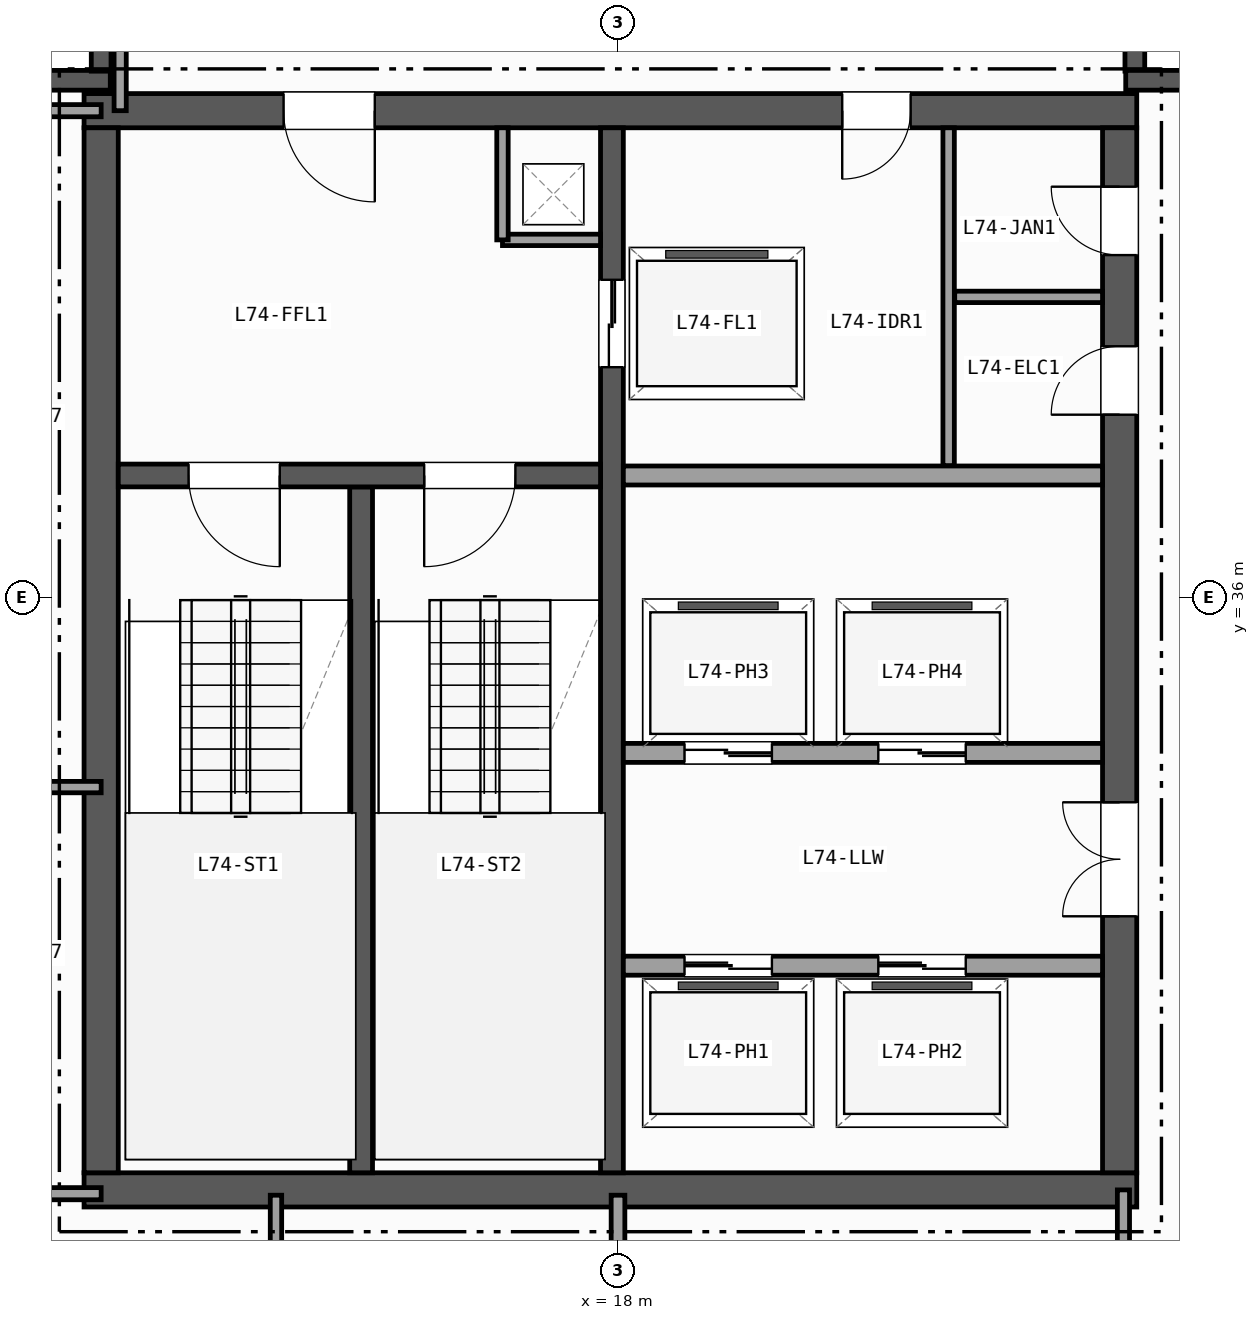
"""IFC4 building model, lengths in metres.
Left out: names, types, materials, properties, quantities, classifications, styles, units other than length and angle.
Written with IfcOpenShell. Run it as: python <this file> out.ifc"""

import sys

from ifc_helpers import new_model, si_unit, direction, frame, frame_2d, origin, place, context, subcontext, project, spatial, rectangle, extrude, element, fill, save


model = new_model("IFC4")
c1 = context("Model", 3, precision=1e-05, world=origin(), true_north=direction((0.0, 1.0)))
c2 = subcontext(c1, "Body", "Model", "MODEL_VIEW")
j1 = project(units=[si_unit("LENGTHUNIT", "METRE"), si_unit("PLANEANGLEUNIT", "RADIAN")], contexts=[c1])
p1 = place(None, origin())
s1 = spatial("IfcSite", under=j1, at=p1, CompositionType="ELEMENT")
p2 = place(p1, origin())
s2 = spatial("IfcBuilding", under=s1, at=p2, CompositionType="ELEMENT")
p3 = place(p2, frame((0.0, 0.0, 293.7)))
s3 = spatial("IfcBuildingStorey", under=s2, at=p3, CompositionType="ELEMENT", Elevation=293.7)
p4 = place(p3, frame((9.0, 42.8, 0.0), z_axis=(0.0, 0.0, 1.0), x_axis=(1.0, 0.0, 0.0)))
e1 = element("IfcWall", 1, at=p4, inside=s3, PredefinedType="SOLIDWALL", context=c2, shape_type="SweptSolid", body=[
    extrude(rectangle(XDim=2.32, YDim=0.26, at=frame_2d((1.16, 0.0))), origin(), (0.0, 0.0, 1.0), 3.37),
])
for number, where, z_axis, x_axis in (
    (2, (11.2, 42.92, 0.0), (0.0, 0.0, 1.0), (0.0, 1.0, 0.0)),
    (3, (24.8, 45.0, 0.0), (0.0, 0.0, 1.0), (0.0, -1.0, 0.0)),
):
    element("IfcWall", number, at=place(p3, frame(where, z_axis=z_axis, x_axis=x_axis)), inside=s3, PredefinedType="SOLIDWALL", context=c2, shape_type="SweptSolid", body=[
        extrude(rectangle(XDim=2.08, YDim=0.26, at=frame_2d((1.04, 0.0))), origin(), (0.0, 0.0, 1.0), 3.37),
    ])
p5 = place(p3, frame((24.68, 42.8, 0.0), z_axis=(0.0, 0.0, 1.0), x_axis=(1.0, 0.0, 0.0)))
e4 = element("IfcWall", 4, at=p5, inside=s3, PredefinedType="SOLIDWALL", context=c2, shape_type="SweptSolid", body=[
    extrude(rectangle(XDim=2.32, YDim=0.26, at=frame_2d((1.16, 0.0))), origin(), (0.0, 0.0, 1.0), 3.37),
])
p6 = place(p3, frame((10.975, 28.2, 0.0), z_axis=(0.0, 0.0, 1.0), x_axis=(1.0, 0.0, 0.0)))
e5 = element("IfcWall", 5, at=p6, inside=s3, PredefinedType="SHEAR", context=c2, shape_type="SweptSolid", body=[
    extrude(rectangle(XDim=13.85, YDim=0.45, at=frame_2d((6.925, 0.0))), origin(), (0.0, 0.0, 1.0), 3.37),
])
p7 = place(p3, frame((24.825, 42.4, 0.0), z_axis=(0.0, 0.0, 1.0), x_axis=(-1.0, 0.0, 0.0)))
e6 = element("IfcWall", 6, at=p7, inside=s3, PredefinedType="SHEAR", context=c2, shape_type="SweptSolid", body=[
    extrude(rectangle(XDim=13.85, YDim=0.45, at=frame_2d((6.925, 0.0))), origin(), (0.0, 0.0, 1.0), 3.37),
])
p8 = place(p7, frame((10.025, 0.0, 0.0)))
e7 = element("IfcOpeningElement", 7, at=p8, cuts=e6, PredefinedType="OPENING", context=c2, shape_type="SweptSolid", body=[
    extrude(rectangle(XDim=1.2, YDim=2.15, at=frame_2d((0.6, 1.075))), frame((0.0, 0.235, 0.0), z_axis=(0.0, -1.0, 0.0), x_axis=(1.0, 0.0, 0.0)), (0.0, 0.0, 1.0), 0.47),
])
p9 = place(p7, frame((2.975, 0.0, 0.0)))
e8 = element("IfcOpeningElement", 8, at=p9, cuts=e6, PredefinedType="OPENING", context=c2, shape_type="SweptSolid", body=[
    extrude(rectangle(XDim=0.9, YDim=2.1, at=frame_2d((0.45, 1.05))), frame((0.0, 0.235, 0.0), z_axis=(0.0, -1.0, 0.0), x_axis=(1.0, 0.0, 0.0)), (0.0, 0.0, 1.0), 0.47),
])
p10 = place(p3, frame((11.2, 42.175, 0.0), z_axis=(0.0, 0.0, 1.0), x_axis=(0.0, -1.0, 0.0)))
e9 = element("IfcWall", 9, at=p10, inside=s3, PredefinedType="SHEAR", context=c2, shape_type="SweptSolid", body=[
    extrude(rectangle(XDim=13.75, YDim=0.45, at=frame_2d((6.875, 0.0))), origin(), (0.0, 0.0, 1.0), 3.37),
])
p11 = place(p3, frame((24.6, 28.425, 0.0), z_axis=(0.0, 0.0, 1.0), x_axis=(0.0, 1.0, 0.0)))
e10 = element("IfcWall", 10, at=p11, inside=s3, PredefinedType="SHEAR", context=c2, shape_type="SweptSolid", body=[
    extrude(rectangle(XDim=13.75, YDim=0.45, at=frame_2d((6.875, 0.0))), origin(), (0.0, 0.0, 1.0), 3.37),
])
p12 = place(p11, frame((3.375, 0.0, 0.0)))
e11 = element("IfcOpeningElement", 11, at=p12, cuts=e10, PredefinedType="OPENING", context=c2, shape_type="SweptSolid", body=[
    extrude(rectangle(XDim=1.5, YDim=2.2, at=frame_2d((0.75, 1.1))), frame((0.0, 0.235, 0.0), z_axis=(0.0, -1.0, 0.0), x_axis=(1.0, 0.0, 0.0)), (0.0, 0.0, 1.0), 0.47),
])
p13 = place(p11, frame((9.975, 0.0, 0.0)))
e12 = element("IfcOpeningElement", 12, at=p13, cuts=e10, PredefinedType="OPENING", context=c2, shape_type="SweptSolid", body=[
    extrude(rectangle(XDim=0.9, YDim=2.1, at=frame_2d((0.45, 1.05))), frame((0.0, 0.235, 0.0), z_axis=(0.0, -1.0, 0.0), x_axis=(1.0, 0.0, 0.0)), (0.0, 0.0, 1.0), 0.47),
])
p14 = place(p11, frame((12.075, 0.0, 0.0)))
e13 = element("IfcOpeningElement", 13, at=p14, cuts=e10, PredefinedType="OPENING", context=c2, shape_type="SweptSolid", body=[
    extrude(rectangle(XDim=0.9, YDim=2.1, at=frame_2d((0.45, 1.05))), frame((0.0, 0.235, 0.0), z_axis=(0.0, -1.0, 0.0), x_axis=(1.0, 0.0, 0.0)), (0.0, 0.0, 1.0), 0.47),
])
p15 = place(p3, frame((14.62, 28.425, 0.0), z_axis=(0.0, 0.0, 1.0), x_axis=(0.0, 1.0, 0.0)))
e14 = element("IfcWall", 14, at=p15, inside=s3, PredefinedType="SHEAR", context=c2, shape_type="SweptSolid", body=[
    extrude(rectangle(XDim=9.025, YDim=0.3, at=frame_2d((4.512, 0.0))), origin(), (0.0, 0.0, 1.0), 3.37),
])
p16 = place(p3, frame((17.92, 42.175, 0.0), z_axis=(0.0, 0.0, 1.0), x_axis=(0.0, -1.0, 0.0)))
e15 = element("IfcWall", 15, at=p16, inside=s3, PredefinedType="SHEAR", context=c2, shape_type="SweptSolid", body=[
    extrude(rectangle(XDim=13.75, YDim=0.3, at=frame_2d((6.875, 0.0))), origin(), (0.0, 0.0, 1.0), 3.37),
])
p17 = place(p16, frame((2.0, 0.0, 0.0)))
e16 = element("IfcOpeningElement", 16, at=p17, cuts=e15, PredefinedType="OPENING", context=c2, shape_type="SweptSolid", body=[
    extrude(rectangle(XDim=1.15, YDim=2.15, at=frame_2d((0.575, 1.075))), frame((0.0, 0.16, 0.0), z_axis=(0.0, -1.0, 0.0), x_axis=(1.0, 0.0, 0.0)), (0.0, 0.0, 1.0), 0.32),
])
p18 = place(p3, frame((17.77, 37.6, 0.0), z_axis=(0.0, 0.0, 1.0), x_axis=(-1.0, 0.0, 0.0)))
e17 = element("IfcWall", 17, at=p18, inside=s3, PredefinedType="SHEAR", context=c2, shape_type="SweptSolid", body=[
    extrude(rectangle(XDim=6.345, YDim=0.3, at=frame_2d((3.172, 0.0))), origin(), (0.0, 0.0, 1.0), 3.37),
])
p19 = place(p18, frame((4.22, 0.0, 0.0)))
e18 = element("IfcOpeningElement", 18, at=p19, cuts=e17, PredefinedType="OPENING", context=c2, shape_type="SweptSolid", body=[
    extrude(rectangle(XDim=1.2, YDim=2.15, at=frame_2d((0.6, 1.075))), frame((0.0, 0.16, 0.0), z_axis=(0.0, -1.0, 0.0), x_axis=(1.0, 0.0, 0.0)), (0.0, 0.0, 1.0), 0.32),
])
p20 = place(p18, frame((1.12, 0.0, 0.0)))
e19 = element("IfcOpeningElement", 19, at=p20, cuts=e17, PredefinedType="OPENING", context=c2, shape_type="SweptSolid", body=[
    extrude(rectangle(XDim=1.2, YDim=2.15, at=frame_2d((0.6, 1.075))), frame((0.0, 0.16, 0.0), z_axis=(0.0, -1.0, 0.0), x_axis=(1.0, 0.0, 0.0)), (0.0, 0.0, 1.0), 0.32),
])
p21 = place(p3, frame((16.48, 40.7, 0.0), z_axis=(0.0, 0.0, 1.0), x_axis=(1.0, 0.0, 0.0)))
e20 = element("IfcWall", 20, at=p21, inside=s3, PredefinedType="PARTITIONING", context=c2, shape_type="SweptSolid", body=[
    extrude(rectangle(XDim=1.29, YDim=0.15, at=frame_2d((0.645, 0.0))), origin(), (0.0, 0.0, 1.0), 3.37),
])
p22 = place(p3, frame((16.48, 40.7, 0.0), z_axis=(0.0, 0.0, 1.0), x_axis=(0.0, 1.0, 0.0)))
e21 = element("IfcWall", 21, at=p22, inside=s3, PredefinedType="PARTITIONING", context=c2, shape_type="SweptSolid", body=[
    extrude(rectangle(XDim=1.475, YDim=0.15, at=frame_2d((0.738, 0.0))), origin(), (0.0, 0.0, 1.0), 3.37),
])
p23 = place(p3, frame((18.07, 37.6, 0.0), z_axis=(0.0, 0.0, 1.0), x_axis=(1.0, 0.0, 0.0)))
e22 = element("IfcWall", 22, at=p23, inside=s3, PredefinedType="PARTITIONING", context=c2, shape_type="SweptSolid", body=[
    extrude(rectangle(XDim=6.305, YDim=0.25, at=frame_2d((3.152, 0.0))), origin(), (0.0, 0.0, 1.0), 3.37),
])
p24 = place(p3, frame((18.07, 31.15, 0.0), z_axis=(0.0, 0.0, 1.0), x_axis=(1.0, 0.0, 0.0)))
e23 = element("IfcWall", 23, at=p24, inside=s3, PredefinedType="PARTITIONING", context=c2, shape_type="SweptSolid", body=[
    extrude(rectangle(XDim=6.305, YDim=0.25, at=frame_2d((3.152, 0.0))), origin(), (0.0, 0.0, 1.0), 3.37),
])
p25 = place(p24, frame((0.805, 0.0, 0.0)))
e24 = element("IfcOpeningElement", 24, at=p25, cuts=e23, PredefinedType="OPENING", context=c2, shape_type="SweptSolid", body=[
    extrude(rectangle(XDim=1.15, YDim=2.15, at=frame_2d((0.575, 1.075))), frame((0.0, 0.135, 0.0), z_axis=(0.0, -1.0, 0.0), x_axis=(1.0, 0.0, 0.0)), (0.0, 0.0, 1.0), 0.27),
])
p26 = place(p24, frame((3.355, 0.0, 0.0)))
e25 = element("IfcOpeningElement", 25, at=p26, cuts=e23, PredefinedType="OPENING", context=c2, shape_type="SweptSolid", body=[
    extrude(rectangle(XDim=1.15, YDim=2.15, at=frame_2d((0.575, 1.075))), frame((0.0, 0.135, 0.0), z_axis=(0.0, -1.0, 0.0), x_axis=(1.0, 0.0, 0.0)), (0.0, 0.0, 1.0), 0.27),
])
p27 = place(p3, frame((24.375, 33.95, 0.0), z_axis=(0.0, 0.0, 1.0), x_axis=(-1.0, 0.0, 0.0)))
e26 = element("IfcWall", 26, at=p27, inside=s3, PredefinedType="PARTITIONING", context=c2, shape_type="SweptSolid", body=[
    extrude(rectangle(XDim=6.305, YDim=0.25, at=frame_2d((3.152, 0.0))), origin(), (0.0, 0.0, 1.0), 3.37),
])
p28 = place(p27, frame((4.35, 0.0, 0.0)))
e27 = element("IfcOpeningElement", 27, at=p28, cuts=e26, PredefinedType="OPENING", context=c2, shape_type="SweptSolid", body=[
    extrude(rectangle(XDim=1.15, YDim=2.15, at=frame_2d((0.575, 1.075))), frame((0.0, 0.135, 0.0), z_axis=(0.0, -1.0, 0.0), x_axis=(1.0, 0.0, 0.0)), (0.0, 0.0, 1.0), 0.27),
])
p29 = place(p27, frame((1.8, 0.0, 0.0)))
e28 = element("IfcOpeningElement", 28, at=p29, cuts=e26, PredefinedType="OPENING", context=c2, shape_type="SweptSolid", body=[
    extrude(rectangle(XDim=1.15, YDim=2.15, at=frame_2d((0.575, 1.075))), frame((0.0, 0.135, 0.0), z_axis=(0.0, -1.0, 0.0), x_axis=(1.0, 0.0, 0.0)), (0.0, 0.0, 1.0), 0.27),
])
p30 = place(p3, frame((22.35, 37.73, 0.0), z_axis=(0.0, 0.0, 1.0), x_axis=(0.0, 1.0, 0.0)))
e29 = element("IfcWall", 29, at=p30, inside=s3, PredefinedType="PARTITIONING", context=c2, shape_type="SweptSolid", body=[
    extrude(rectangle(XDim=4.445, YDim=0.15, at=frame_2d((2.223, 0.0))), origin(), (0.0, 0.0, 1.0), 3.37),
])
p31 = place(p3, frame((22.43, 39.95, 0.0), z_axis=(0.0, 0.0, 1.0), x_axis=(1.0, 0.0, 0.0)))
e30 = element("IfcWall", 30, at=p31, inside=s3, PredefinedType="PARTITIONING", context=c2, shape_type="SweptSolid", body=[
    extrude(rectangle(XDim=1.945, YDim=0.15, at=frame_2d((0.973, 0.0))), origin(), (0.0, 0.0, 1.0), 3.37),
])
p32 = place(p3, frame((9.0, 28.15, 0.0), z_axis=(0.0, 0.0, 1.0), x_axis=(1.0, 0.0, 0.0)))
e31 = element("IfcWall", 31, at=p32, inside=s3, PredefinedType="PARTITIONING", context=c2, shape_type="SweptSolid", body=[
    extrude(rectangle(XDim=2.2, YDim=0.16, at=frame_2d((1.1, 0.0))), origin(), (0.0, 0.0, 1.0), 2.657),
])
p33 = place(p32, frame((0.45, 0.0, 0.0)))
e32 = element("IfcOpeningElement", 32, at=p33, cuts=e31, PredefinedType="OPENING", context=c2, shape_type="SweptSolid", body=[
    extrude(rectangle(XDim=1.05, YDim=2.15, at=frame_2d((0.525, 1.075))), frame((0.0, 0.09, 0.0), z_axis=(0.0, -1.0, 0.0), x_axis=(1.0, 0.0, 0.0)), (0.0, 0.0, 1.0), 0.18),
])
p34 = place(p3, frame((8.761, 42.4, 0.0), z_axis=(0.0, 0.0, 1.0), x_axis=(1.0, 0.0, 0.0)))
e33 = element("IfcWall", 33, at=p34, inside=s3, PredefinedType="PARTITIONING", context=c2, shape_type="SweptSolid", body=[
    extrude(rectangle(XDim=2.439, YDim=0.16, at=frame_2d((1.219, 0.0))), origin(), (0.0, 0.0, 1.0), 3.37),
])
p35 = place(p3, frame((11.45, 42.4, 0.0), z_axis=(0.0, 0.0, 1.0), x_axis=(0.0, 1.0, 0.0)))
e34 = element("IfcWall", 34, at=p35, inside=s3, PredefinedType="PARTITIONING", context=c2, shape_type="SweptSolid", body=[
    extrude(rectangle(XDim=2.666, YDim=0.16, at=frame_2d((1.333, 0.0))), origin(), (0.0, 0.0, 1.0), 3.37),
])
p36 = place(p3, frame((9.0, 33.5, 0.0), z_axis=(0.0, 0.0, 1.0), x_axis=(1.0, 0.0, 0.0)))
e35 = element("IfcWall", 35, at=p36, inside=s3, PredefinedType="PARTITIONING", context=c2, shape_type="SweptSolid", body=[
    extrude(rectangle(XDim=2.2, YDim=0.15, at=frame_2d((1.1, 0.0))), origin(), (0.0, 0.0, 1.0), 2.657),
])
p37 = place(p36, frame((0.45, 0.0, 0.0)))
e36 = element("IfcOpeningElement", 36, at=p37, cuts=e35, PredefinedType="OPENING", context=c2, shape_type="SweptSolid", body=[
    extrude(rectangle(XDim=0.9, YDim=2.1, at=frame_2d((0.45, 1.05))), frame((0.0, 0.085, 0.0), z_axis=(0.0, -1.0, 0.0), x_axis=(1.0, 0.0, 0.0)), (0.0, 0.0, 1.0), 0.17),
])
p38 = place(p3, frame((24.65, 9.0, 0.0), z_axis=(0.0, 0.0, 1.0), x_axis=(0.0, 1.0, 0.0)))
e37 = element("IfcWall", 37, at=p38, inside=s3, PredefinedType="PARTITIONING", context=c2, shape_type="SweptSolid", body=[
    extrude(rectangle(XDim=19.2, YDim=0.16, at=frame_2d((9.6, 0.0))), origin(), (0.0, 0.0, 1.0), 2.657),
])
p39 = place(p38, frame((15.2, 0.0, 0.0)))
e38 = element("IfcOpeningElement", 38, at=p39, cuts=e37, PredefinedType="OPENING", context=c2, shape_type="SweptSolid", body=[
    extrude(rectangle(XDim=0.86, YDim=2.05, at=frame_2d((0.43, 1.025))), frame((0.0, 0.09, 0.0), z_axis=(0.0, -1.0, 0.0), x_axis=(1.0, 0.0, 0.0)), (0.0, 0.0, 1.0), 0.18),
])
p40 = place(p38, frame((10.5, 0.0, 0.0)))
e39 = element("IfcOpeningElement", 39, at=p40, cuts=e37, PredefinedType="OPENING", context=c2, shape_type="SweptSolid", body=[
    extrude(rectangle(XDim=0.95, YDim=2.1, at=frame_2d((0.475, 1.05))), frame((0.0, 0.09, 0.0), z_axis=(0.0, -1.0, 0.0), x_axis=(1.0, 0.0, 0.0)), (0.0, 0.0, 1.0), 0.18),
])
p41 = place(p38, frame((6.0, 0.0, 0.0)))
e40 = element("IfcOpeningElement", 40, at=p41, cuts=e37, PredefinedType="OPENING", context=c2, shape_type="SweptSolid", body=[
    extrude(rectangle(XDim=1.0, YDim=2.1, at=frame_2d((0.5, 1.05))), frame((0.0, 0.09, 0.0), z_axis=(0.0, -1.0, 0.0), x_axis=(1.0, 0.0, 0.0)), (0.0, 0.0, 1.0), 0.18),
])
p42 = place(p38, frame((2.55, 0.0, 0.0)))
e41 = element("IfcOpeningElement", 41, at=p42, cuts=e37, PredefinedType="OPENING", context=c2, shape_type="SweptSolid", body=[
    extrude(rectangle(XDim=1.05, YDim=2.15, at=frame_2d((0.525, 1.075))), frame((0.0, 0.09, 0.0), z_axis=(0.0, -1.0, 0.0), x_axis=(1.0, 0.0, 0.0)), (0.0, 0.0, 1.0), 0.18),
])
p43 = place(p3, frame((18.0, 9.0, 0.0), z_axis=(0.0, 0.0, 1.0), x_axis=(0.0, 1.0, 0.0)))
e42 = element("IfcWall", 42, at=p43, inside=s3, PredefinedType="PARTITIONING", context=c2, shape_type="SweptSolid", body=[
    extrude(rectangle(XDim=19.13, YDim=0.18, at=frame_2d((9.565, 0.0))), origin(), (0.0, 0.0, 1.0), 2.657),
])
p44 = place(p43, frame((11.5, 0.0, 0.0)))
e43 = element("IfcOpeningElement", 43, at=p44, cuts=e42, PredefinedType="OPENING", context=c2, shape_type="SweptSolid", body=[
    extrude(rectangle(XDim=1.2, YDim=2.15, at=frame_2d((0.6, 1.075))), frame((0.0, 0.1, 0.0), z_axis=(0.0, -1.0, 0.0), x_axis=(1.0, 0.0, 0.0)), (0.0, 0.0, 1.0), 0.2),
])
p45 = place(p43, frame((3.0, 0.0, 0.0)))
e44 = element("IfcOpeningElement", 44, at=p45, cuts=e42, PredefinedType="OPENING", context=c2, shape_type="SweptSolid", body=[
    extrude(rectangle(XDim=0.95, YDim=2.1, at=frame_2d((0.475, 1.05))), frame((0.0, 0.1, 0.0), z_axis=(0.0, -1.0, 0.0), x_axis=(1.0, 0.0, 0.0)), (0.0, 0.0, 1.0), 0.2),
])
p46 = place(p3, frame((13.5, 18.0, 0.0), z_axis=(0.0, 0.0, 1.0), x_axis=(0.0, 1.0, 0.0)))
e45 = element("IfcWall", 45, at=p46, inside=s3, PredefinedType="PARTITIONING", context=c2, shape_type="SweptSolid", body=[
    extrude(rectangle(XDim=10.13, YDim=0.15, at=frame_2d((5.065, 0.0))), origin(), (0.0, 0.0, 1.0), 2.739),
])
p47 = place(p46, frame((3.0, 0.0, 0.0)))
e46 = element("IfcOpeningElement", 46, at=p47, cuts=e45, PredefinedType="OPENING", context=c2, shape_type="SweptSolid", body=[
    extrude(rectangle(XDim=0.9, YDim=2.1, at=frame_2d((0.45, 1.05))), frame((0.0, 0.085, 0.0), z_axis=(0.0, -1.0, 0.0), x_axis=(1.0, 0.0, 0.0)), (0.0, 0.0, 1.0), 0.17),
])
p48 = place(p19, origin())
e47 = element("IfcDoor", 47, at=p48, inside=s3, OperationType="SINGLE_SWING_LEFT", PredefinedType="DOOR", context=c2, shape_type="SweptSolid", body=[
    extrude(rectangle(XDim=1.2, YDim=2.15, at=frame_2d((0.6, 1.075))), frame((0.0, 0.025, 0.0), z_axis=(0.0, -1.0, 0.0), x_axis=(1.0, 0.0, 0.0)), (0.0, 0.0, 1.0), 0.05),
])
fill(e18, e47)
p49 = place(p20, origin())
e48 = element("IfcDoor", 48, at=p49, inside=s3, OperationType="SINGLE_SWING_RIGHT", PredefinedType="DOOR", context=c2, shape_type="SweptSolid", body=[
    extrude(rectangle(XDim=1.2, YDim=2.15, at=frame_2d((0.6, 1.075))), frame((0.0, 0.025, 0.0), z_axis=(0.0, -1.0, 0.0), x_axis=(1.0, 0.0, 0.0)), (0.0, 0.0, 1.0), 0.05),
])
fill(e19, e48)
p50 = place(p12, origin())
e49 = element("IfcDoor", 49, at=p50, inside=s3, OperationType="DOUBLE_DOOR_SINGLE_SWING", PredefinedType="DOOR", context=c2, shape_type="SweptSolid", body=[
    extrude(rectangle(XDim=1.5, YDim=2.2, at=frame_2d((0.75, 1.1))), frame((0.0, 0.025, 0.0), z_axis=(0.0, -1.0, 0.0), x_axis=(1.0, 0.0, 0.0)), (0.0, 0.0, 1.0), 0.05),
])
fill(e11, e49)
p51 = place(p8, origin())
e50 = element("IfcDoor", 50, at=p51, inside=s3, OperationType="SINGLE_SWING_LEFT", PredefinedType="DOOR", context=c2, shape_type="SweptSolid", body=[
    extrude(rectangle(XDim=1.2, YDim=2.15, at=frame_2d((0.6, 1.075))), frame((0.0, 0.025, 0.0), z_axis=(0.0, -1.0, 0.0), x_axis=(1.0, 0.0, 0.0)), (0.0, 0.0, 1.0), 0.05),
])
fill(e7, e50)
p52 = place(p13, origin())
e51 = element("IfcDoor", 51, at=p52, inside=s3, OperationType="SINGLE_SWING_LEFT", PredefinedType="DOOR", context=c2, shape_type="SweptSolid", body=[
    extrude(rectangle(XDim=0.9, YDim=2.1, at=frame_2d((0.45, 1.05))), frame((0.0, 0.025, 0.0), z_axis=(0.0, -1.0, 0.0), x_axis=(1.0, 0.0, 0.0)), (0.0, 0.0, 1.0), 0.05),
])
fill(e12, e51)
p53 = place(p9, origin())
e52 = element("IfcDoor", 52, at=p53, inside=s3, OperationType="SINGLE_SWING_RIGHT", PredefinedType="DOOR", context=c2, shape_type="SweptSolid", body=[
    extrude(rectangle(XDim=0.9, YDim=2.1, at=frame_2d((0.45, 1.05))), frame((0.0, 0.025, 0.0), z_axis=(0.0, -1.0, 0.0), x_axis=(1.0, 0.0, 0.0)), (0.0, 0.0, 1.0), 0.05),
])
fill(e8, e52)
p54 = place(p14, origin())
e53 = element("IfcDoor", 53, at=p54, inside=s3, OperationType="SINGLE_SWING_RIGHT", PredefinedType="DOOR", context=c2, shape_type="SweptSolid", body=[
    extrude(rectangle(XDim=0.9, YDim=2.1, at=frame_2d((0.45, 1.05))), frame((0.0, 0.025, 0.0), z_axis=(0.0, -1.0, 0.0), x_axis=(1.0, 0.0, 0.0)), (0.0, 0.0, 1.0), 0.05),
])
fill(e13, e53)
p55 = place(p17, origin())
e54 = element("IfcDoor", 54, at=p55, inside=s3, OperationType="DOUBLE_DOOR_SLIDING", PredefinedType="DOOR", context=c2, shape_type="SweptSolid", body=[
    extrude(rectangle(XDim=1.15, YDim=2.15, at=frame_2d((0.575, 1.075))), frame((0.0, 0.025, 0.0), z_axis=(0.0, -1.0, 0.0), x_axis=(1.0, 0.0, 0.0)), (0.0, 0.0, 1.0), 0.05),
])
fill(e16, e54)
p56 = place(p25, origin())
e55 = element("IfcDoor", 55, at=p56, inside=s3, OperationType="DOUBLE_DOOR_SLIDING", PredefinedType="DOOR", context=c2, shape_type="SweptSolid", body=[
    extrude(rectangle(XDim=1.15, YDim=2.15, at=frame_2d((0.575, 1.075))), frame((0.0, 0.025, 0.0), z_axis=(0.0, -1.0, 0.0), x_axis=(1.0, 0.0, 0.0)), (0.0, 0.0, 1.0), 0.05),
])
fill(e24, e55)
p57 = place(p26, origin())
e56 = element("IfcDoor", 56, at=p57, inside=s3, OperationType="DOUBLE_DOOR_SLIDING", PredefinedType="DOOR", context=c2, shape_type="SweptSolid", body=[
    extrude(rectangle(XDim=1.15, YDim=2.15, at=frame_2d((0.575, 1.075))), frame((0.0, 0.025, 0.0), z_axis=(0.0, -1.0, 0.0), x_axis=(1.0, 0.0, 0.0)), (0.0, 0.0, 1.0), 0.05),
])
fill(e25, e56)
p58 = place(p28, origin())
e57 = element("IfcDoor", 57, at=p58, inside=s3, OperationType="DOUBLE_DOOR_SLIDING", PredefinedType="DOOR", context=c2, shape_type="SweptSolid", body=[
    extrude(rectangle(XDim=1.15, YDim=2.15, at=frame_2d((0.575, 1.075))), frame((0.0, 0.025, 0.0), z_axis=(0.0, -1.0, 0.0), x_axis=(1.0, 0.0, 0.0)), (0.0, 0.0, 1.0), 0.05),
])
fill(e27, e57)
p59 = place(p29, origin())
e58 = element("IfcDoor", 58, at=p59, inside=s3, OperationType="DOUBLE_DOOR_SLIDING", PredefinedType="DOOR", context=c2, shape_type="SweptSolid", body=[
    extrude(rectangle(XDim=1.15, YDim=2.15, at=frame_2d((0.575, 1.075))), frame((0.0, 0.025, 0.0), z_axis=(0.0, -1.0, 0.0), x_axis=(1.0, 0.0, 0.0)), (0.0, 0.0, 1.0), 0.05),
])
fill(e28, e58)
save(model, sys.argv[1])
